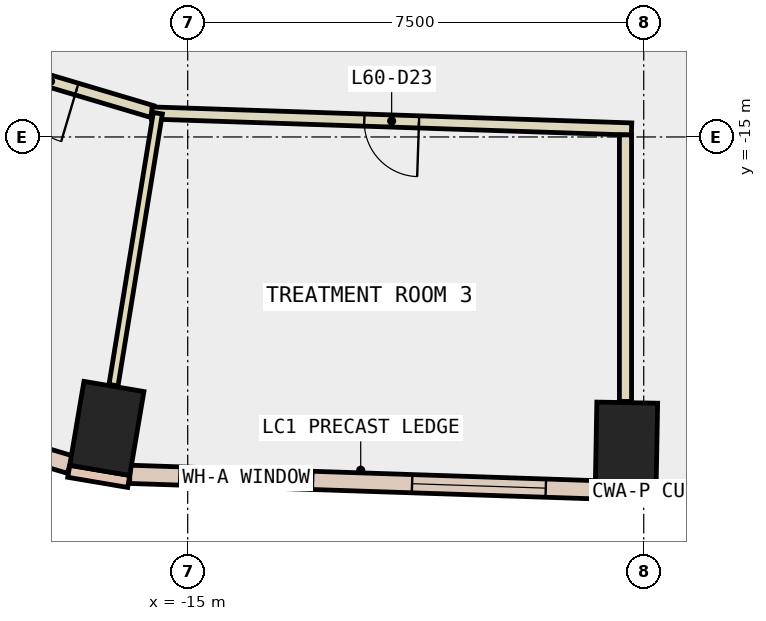
"""IFC4 building model, lengths in metres.
Left out: names, types, materials, properties, quantities, classifications, styles, units other than length and angle.
Written with IfcOpenShell. Run it as: python <this file> out.ifc"""

import sys

from ifc_helpers import new_model, si_unit, direction, frame, frame_2d, origin, origin_2d, place, context, subcontext, project, spatial, rectangle, extrude, element, fill, save


model = new_model("IFC4")
c1 = context("Model", 3, precision=1e-05, world=origin(), true_north=direction((0.0, 1.0)))
c2 = subcontext(c1, "Body", "Model", "MODEL_VIEW")
j1 = project(units=[si_unit("LENGTHUNIT", "METRE"), si_unit("PLANEANGLEUNIT", "RADIAN")], contexts=[c1])
p1 = place(None, origin())
s1 = spatial("IfcSite", under=j1, at=p1, CompositionType="ELEMENT")
p2 = place(p1, origin())
s2 = spatial("IfcBuilding", under=s1, at=p2, CompositionType="ELEMENT")
p3 = place(p2, frame((0.0, 0.0, 263.0)))
s3 = spatial("IfcBuildingStorey", under=s2, at=p3, CompositionType="ELEMENT", Elevation=263.0)
for number, where, z_axis, x_axis in (
    (1, (-16.33, -19.793, -0.34), (0.0, 0.0, 1.0), (-0.986, 0.167, 0.0)),
    (2, (-7.784, -20.069, -0.34), (0.0, 0.0, 1.0), (-1.0, 0.018, 0.0)),
):
    element("IfcColumn", number, at=place(p3, frame(where, z_axis=z_axis, x_axis=x_axis)), inside=s3, PredefinedType="COLUMN", context=c2, shape_type="SweptSolid", body=[
        extrude(rectangle(XDim=1.0, YDim=1.4, at=origin_2d()), origin(), (0.0, 0.0, 1.0), 3.6),
    ])
for number, where, z_axis, x_axis in (
    (3, (-16.956, -20.498, 0.0), (0.0, 0.0, 1.0), (0.986, -0.167, 0.0)),
    (4, (-8.298, -20.86, 0.0), (0.0, 0.0, 1.0), (1.0, -0.018, 0.0)),
):
    element("IfcWall", number, at=place(p3, frame(where, z_axis=z_axis, x_axis=x_axis)), inside=s3, PredefinedType="STANDARD", context=c2, shape_type="SweptSolid", body=[
        extrude(rectangle(XDim=1.0, YDim=0.2, at=frame_2d((0.5, 0.0))), origin(), (0.0, 0.0, 1.0), 3.26),
    ])
p4 = place(p3, frame((-15.951, -20.548, 0.0), z_axis=(0.0, 0.0, 1.0), x_axis=(0.999450376985, -0.033150323459, 0.0)))
e5 = element("IfcWall", 5, at=p4, inside=s3, PredefinedType="STANDARD", context=c2, shape_type="SweptSolid", body=[
    extrude(rectangle(XDim=7.659, YDim=0.3, at=frame_2d((3.83, 0.0))), origin(), (0.0, 0.0, 1.0), 3.26),
])
p5 = place(p4, frame((0.815, 0.0, 0.9)))
e6 = element("IfcOpeningElement", 6, at=p5, cuts=e5, PredefinedType="OPENING", context=c2, shape_type="SweptSolid", body=[
    extrude(rectangle(XDim=2.2, YDim=2.0, at=frame_2d((1.1, 1.0))), frame((0.0, 0.16, 0.0), z_axis=(0.0, -1.0, 0.0), x_axis=(1.0, 0.0, 0.0)), (0.0, 0.0, 1.0), 0.32),
])
p6 = place(p4, frame((4.644, 0.0, 0.9)))
e7 = element("IfcOpeningElement", 7, at=p6, cuts=e5, PredefinedType="OPENING", context=c2, shape_type="SweptSolid", body=[
    extrude(rectangle(XDim=2.2, YDim=2.0, at=frame_2d((1.1, 1.0))), frame((0.0, 0.16, 0.0), z_axis=(0.0, -1.0, 0.0), x_axis=(1.0, 0.0, 0.0)), (0.0, 0.0, 1.0), 0.32),
])
p7 = place(p3, frame((-21.401, -19.057, 0.0), z_axis=(0.0, 0.0, 1.0), x_axis=(0.958361270465, -0.285558532131, 0.0)))
e8 = element("IfcWall", 8, at=p7, inside=s3, PredefinedType="STANDARD", context=c2, shape_type="SweptSolid", body=[
    extrude(rectangle(XDim=4.658, YDim=0.3, at=frame_2d((2.329, 0.0))), origin(), (0.0, 0.0, 1.0), 3.26),
])
p8 = place(p7, frame((1.629, 0.0, 0.9)))
e9 = element("IfcOpeningElement", 9, at=p8, cuts=e8, PredefinedType="OPENING", context=c2, shape_type="SweptSolid", body=[
    extrude(rectangle(XDim=1.4, YDim=2.0, at=frame_2d((0.7, 1.0))), frame((0.0, 0.16, 0.0), z_axis=(0.0, -1.0, 0.0), x_axis=(1.0, 0.0, 0.0)), (0.0, 0.0, 1.0), 0.32),
])
p9 = place(p3, frame((-15.587, -14.581, 0.0), z_axis=(0.0, 0.0, 1.0), x_axis=(-0.958378336681, 0.285501250052, 0.0)))
e10 = element("IfcWall", 10, at=p9, inside=s3, PredefinedType="PARTITIONING", context=c2, shape_type="SweptSolid", body=[
    extrude(rectangle(XDim=3.482, YDim=0.2, at=frame_2d((1.741, 0.0))), origin(), (0.0, 0.0, 1.0), 3.26),
])
p10 = place(p9, frame((1.291, 0.0, 0.0)))
e11 = element("IfcOpeningElement", 11, at=p10, cuts=e10, PredefinedType="OPENING", context=c2, shape_type="SweptSolid", body=[
    extrude(rectangle(XDim=0.9, YDim=2.1, at=frame_2d((0.45, 1.05))), frame((0.0, 0.11, 0.0), z_axis=(0.0, -1.0, 0.0), x_axis=(1.0, 0.0, 0.0)), (0.0, 0.0, 1.0), 0.22),
])
p11 = place(p3, frame((-7.7, -14.869, 0.0), z_axis=(0.0, 0.0, 1.0), x_axis=(-0.999445318732, 0.03330247535, 0.0)))
e12 = element("IfcWall", 12, at=p11, inside=s3, PredefinedType="PARTITIONING", context=c2, shape_type="SweptSolid", body=[
    extrude(rectangle(XDim=7.896, YDim=0.2, at=frame_2d((3.948, 0.0))), origin(), (0.0, 0.0, 1.0), 3.26),
])
p12 = place(p11, frame((3.498, 0.0, 0.0)))
e13 = element("IfcOpeningElement", 13, at=p12, cuts=e12, PredefinedType="OPENING", context=c2, shape_type="SweptSolid", body=[
    extrude(rectangle(XDim=0.9, YDim=2.1, at=frame_2d((0.45, 1.05))), frame((0.0, 0.11, 0.0), z_axis=(0.0, -1.0, 0.0), x_axis=(1.0, 0.0, 0.0)), (0.0, 0.0, 1.0), 0.22),
])
p13 = place(p3, frame((-7.8, -19.349, 0.0), z_axis=(0.0, 0.0, 1.0), x_axis=(0.0, 1.0, 0.0)))
e14 = element("IfcWall", 14, at=p13, inside=s3, PredefinedType="PARTITIONING", context=c2, shape_type="SweptSolid", body=[
    extrude(rectangle(XDim=4.383, YDim=0.2, at=frame_2d((2.191, 0.0))), origin(), (0.0, 0.0, 1.0), 3.26),
])
p14 = place(p3, frame((-15.491, -14.61, 0.0), z_axis=(0.0, 0.0, 1.0), x_axis=(-0.160928343418, -0.986966092774, 0.0)))
e15 = element("IfcWall", 15, at=p14, inside=s3, PredefinedType="PARTITIONING", context=c2, shape_type="SweptSolid", body=[
    extrude(rectangle(XDim=4.53, YDim=0.15, at=frame_2d((2.265, 0.0))), origin(), (0.0, 0.0, 1.0), 3.26),
])
p15 = place(p5, origin())
e16 = element("IfcWindow", 16, at=p15, inside=s3, PartitioningType="SINGLE_PANEL", PredefinedType="WINDOW", context=c2, shape_type="SweptSolid", body=[
    extrude(rectangle(XDim=2.2, YDim=2.0, at=frame_2d((1.1, 1.0))), frame((0.0, 0.03, 0.0), z_axis=(0.0, -1.0, 0.0), x_axis=(1.0, 0.0, 0.0)), (0.0, 0.0, 1.0), 0.06),
])
fill(e6, e16)
p16 = place(p6, origin())
e17 = element("IfcWindow", 17, at=p16, inside=s3, PartitioningType="SINGLE_PANEL", PredefinedType="WINDOW", context=c2, shape_type="SweptSolid", body=[
    extrude(rectangle(XDim=2.2, YDim=2.0, at=frame_2d((1.1, 1.0))), frame((0.0, 0.03, 0.0), z_axis=(0.0, -1.0, 0.0), x_axis=(1.0, 0.0, 0.0)), (0.0, 0.0, 1.0), 0.06),
])
fill(e7, e17)
p17 = place(p10, origin())
e18 = element("IfcDoor", 18, at=p17, inside=s3, OperationType="SINGLE_SWING_LEFT", PredefinedType="DOOR", context=c2, shape_type="SweptSolid", body=[
    extrude(rectangle(XDim=0.9, YDim=2.1, at=frame_2d((0.45, 1.05))), frame((0.0, 0.025, 0.0), z_axis=(0.0, -1.0, 0.0), x_axis=(1.0, 0.0, 0.0)), (0.0, 0.0, 1.0), 0.05),
])
fill(e11, e18)
p18 = place(p12, origin())
e19 = element("IfcDoor", 19, at=p18, inside=s3, OperationType="SINGLE_SWING_LEFT", PredefinedType="DOOR", context=c2, shape_type="SweptSolid", body=[
    extrude(rectangle(XDim=0.9, YDim=2.1, at=frame_2d((0.45, 1.05))), frame((0.0, 0.025, 0.0), z_axis=(0.0, -1.0, 0.0), x_axis=(1.0, 0.0, 0.0)), (0.0, 0.0, 1.0), 0.05),
])
fill(e13, e19)
save(model, sys.argv[1])
